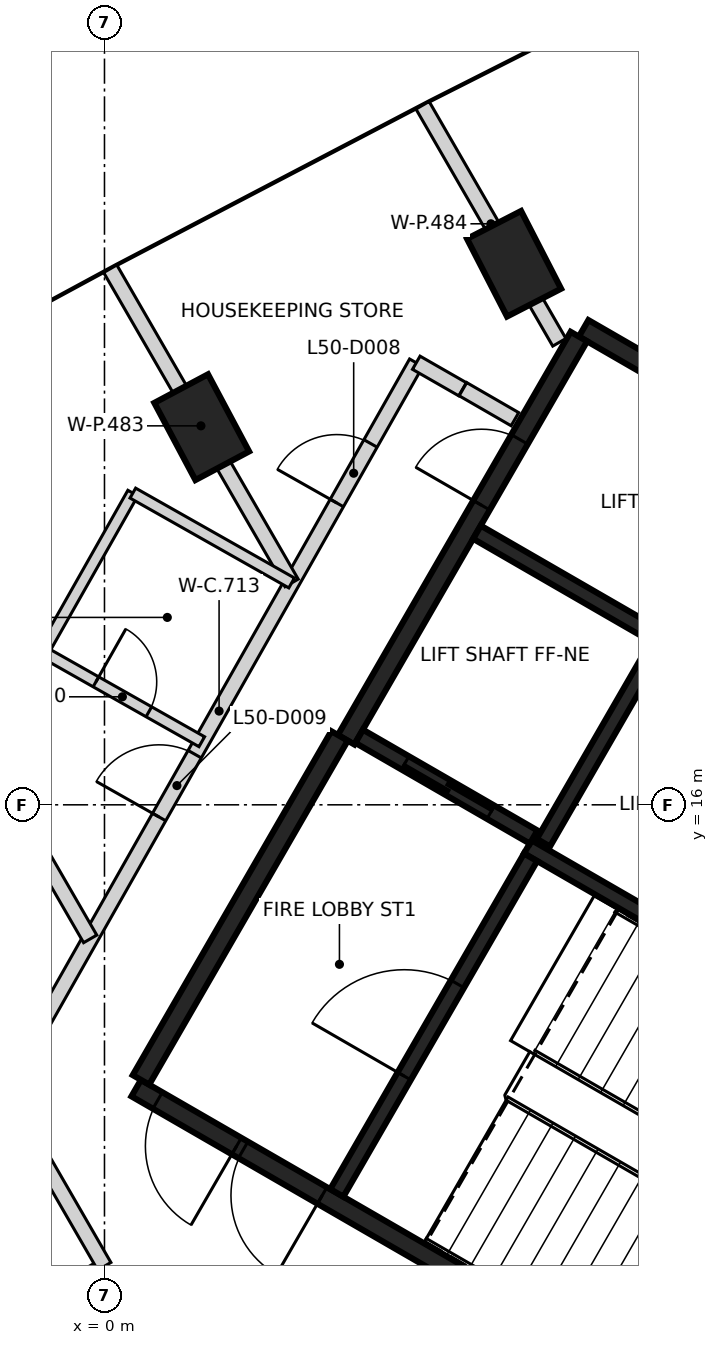
"""IFC4 building model, lengths in metres.
Left out: names, types, materials, properties, quantities, classifications, styles, units other than length and angle.
Written with IfcOpenShell. Run it as: python <this file> out.ifc"""

import sys

from ifc_helpers import new_model, si_unit, direction, frame, frame_2d, origin, origin_2d, place, context, subcontext, project, spatial, rectangle, extrude, element, fill, save


model = new_model("IFC4")
c1 = context("Model", 3, precision=1e-05, world=origin(), true_north=direction((0.0, 1.0)))
c2 = subcontext(c1, "Body", "Model", "MODEL_VIEW")
j1 = project(units=[si_unit("LENGTHUNIT", "METRE"), si_unit("PLANEANGLEUNIT", "RADIAN")], contexts=[c1])
p1 = place(None, origin())
s1 = spatial("IfcSite", under=j1, at=p1, CompositionType="ELEMENT")
p2 = place(p1, origin())
s2 = spatial("IfcBuilding", under=s1, at=p2, CompositionType="ELEMENT")
p3 = place(p2, frame((0.0, 0.0, 200.8)))
s3 = spatial("IfcBuildingStorey", under=s2, at=p3, CompositionType="ELEMENT", Elevation=200.8)
for number, where, z_axis, x_axis in (
    (1, (5.388, 23.118, -0.35), (0.0, 0.0, 1.0), (-0.458, 0.889, 0.0)),
    (2, (1.279, 20.968, -0.35), (0.0, 0.0, 1.0), (-0.47, 0.883, 0.0)),
):
    element("IfcColumn", number, at=place(p3, frame(where, z_axis=z_axis, x_axis=x_axis)), inside=s3, PredefinedType="COLUMN", context=c2, shape_type="SweptSolid", body=[
        extrude(rectangle(XDim=1.15, YDim=0.8, at=origin_2d()), origin(), (0.0, 0.0, 1.0), 3.6),
    ])
p4 = place(p3, frame((10.42, 6.498, 0.0), z_axis=(0.0, 0.0, 1.0), x_axis=(-0.866021906294, 0.500006057782, 0.0)))
e3 = element("IfcWall", 3, at=p4, inside=s3, PredefinedType="SHEAR", context=c2, shape_type="SweptSolid", body=[
    extrude(rectangle(XDim=11.55, YDim=0.25, at=frame_2d((5.775, 0.0))), origin(), (0.0, 0.0, 1.0), 3.25),
])
p5 = place(p4, frame((10.025, 0.0, 0.0)))
e4 = element("IfcOpeningElement", 4, at=p5, cuts=e3, PredefinedType="OPENING", context=c2, shape_type="SweptSolid", body=[
    extrude(rectangle(XDim=1.2, YDim=2.1, at=frame_2d((0.6, 1.05))), frame((0.0, 0.135, 0.0), z_axis=(0.0, -1.0, 0.0), x_axis=(1.0, 0.0, 0.0)), (0.0, 0.0, 1.0), 0.27),
])
p6 = place(p4, frame((8.725, 0.0, 0.0)))
e5 = element("IfcOpeningElement", 5, at=p6, cuts=e3, PredefinedType="OPENING", context=c2, shape_type="SweptSolid", body=[
    extrude(rectangle(XDim=1.2, YDim=2.1, at=frame_2d((0.6, 1.05))), frame((0.0, 0.135, 0.0), z_axis=(0.0, -1.0, 0.0), x_axis=(1.0, 0.0, 0.0)), (0.0, 0.0, 1.0), 0.27),
])
p7 = place(p3, frame((6.304, 22.269, 0.0), z_axis=(0.0, 0.0, 1.0), x_axis=(0.866022959057, -0.500004234368, 0.0)))
e6 = element("IfcWall", 6, at=p7, inside=s3, PredefinedType="SHEAR", context=c2, shape_type="SweptSolid", body=[
    extrude(rectangle(XDim=8.75, YDim=0.25, at=frame_2d((4.375, 0.0))), origin(), (0.0, 0.0, 1.0), 3.25),
])
p8 = place(p3, frame((3.179, 16.856, 0.0), z_axis=(0.0, 0.0, 1.0), x_axis=(0.500001955336, 0.866024274868, 0.0)))
e7 = element("IfcWall", 7, at=p8, inside=s3, PredefinedType="SHEAR", context=c2, shape_type="SweptSolid", body=[
    extrude(rectangle(XDim=6.125, YDim=0.25, at=frame_2d((3.062, 0.0))), origin(), (0.0, 0.0, 1.0), 3.25),
])
p9 = place(p8, frame((3.563, 0.0, 0.0)))
e8 = element("IfcOpeningElement", 8, at=p9, cuts=e7, PredefinedType="OPENING", context=c2, shape_type="SweptSolid", body=[
    extrude(rectangle(XDim=1.0, YDim=2.1, at=frame_2d((0.5, 1.05))), frame((0.0, 0.135, 0.0), z_axis=(0.0, -1.0, 0.0), x_axis=(1.0, 0.0, 0.0)), (0.0, 0.0, 1.0), 0.27),
])
p10 = place(p3, frame((0.48, 12.381, 0.0), z_axis=(0.0, 0.0, 1.0), x_axis=(0.49999885962, 0.866026062182, 0.0)))
e9 = element("IfcWall", 9, at=p10, inside=s3, PredefinedType="SHEAR", context=c2, shape_type="SweptSolid", body=[
    extrude(rectangle(XDim=5.225, YDim=0.25, at=frame_2d((2.612, 0.0))), origin(), (0.0, 0.0, 1.0), 3.25),
])
p11 = place(p3, frame((10.743, 12.46, 0.0), z_axis=(0.0, 0.0, 1.0), x_axis=(-0.866018848283, 0.500011354289, 0.0)))
e10 = element("IfcWall", 10, at=p11, inside=s3, PredefinedType="SHEAR", context=c2, shape_type="SweptSolid", body=[
    extrude(rectangle(XDim=5.974, YDim=0.2, at=frame_2d((2.987, 0.0))), origin(), (0.0, 0.0, 1.0), 3.25),
])
p12 = place(p3, frame((3.057, 10.895, 0.0), z_axis=(0.0, 0.0, 1.0), x_axis=(0.500027839223, 0.866009330205, 0.0)))
e11 = element("IfcWall", 11, at=p12, inside=s3, PredefinedType="SHEAR", context=c2, shape_type="SweptSolid", body=[
    extrude(rectangle(XDim=5.098, YDim=0.2, at=frame_2d((2.549, 0.0))), origin(), (0.0, 0.0, 1.0), 3.25),
])
p13 = place(p12, frame((1.774, 0.0, 0.0)))
e12 = element("IfcOpeningElement", 12, at=p13, cuts=e11, PredefinedType="OPENING", context=c2, shape_type="SweptSolid", body=[
    extrude(rectangle(XDim=1.4, YDim=2.1, at=frame_2d((0.7, 1.05))), frame((0.0, 0.11, 0.0), z_axis=(0.0, -1.0, 0.0), x_axis=(1.0, 0.0, 0.0)), (0.0, 0.0, 1.0), 0.22),
])
p14 = place(p3, frame((7.324, 18.187, 0.0), z_axis=(0.0, 0.0, 1.0), x_axis=(-0.499967891604, -0.866043940782, 0.0)))
e13 = element("IfcWall", 13, at=p14, inside=s3, PredefinedType="SHEAR", context=c2, shape_type="SweptSolid", body=[
    extrude(rectangle(XDim=3.1, YDim=0.2, at=frame_2d((1.55, 0.0))), origin(), (0.0, 0.0, 1.0), 3.25),
])
p15 = place(p3, frame((5.646, 15.576, 0.0), z_axis=(0.0, 0.0, 1.0), x_axis=(-0.866018407898, 0.500012117035, 0.0)))
e14 = element("IfcWall", 14, at=p15, inside=s3, PredefinedType="SHEAR", context=c2, shape_type="SweptSolid", body=[
    extrude(rectangle(XDim=2.651, YDim=0.2, at=frame_2d((1.325, 0.0))), origin(), (0.0, 0.0, 1.0), 3.25),
])
p16 = place(p15, frame((0.652, 0.0, 0.0)))
e15 = element("IfcOpeningElement", 15, at=p16, cuts=e14, PredefinedType="OPENING", context=c2, shape_type="SweptSolid", body=[
    extrude(rectangle(XDim=1.3, YDim=2.1, at=frame_2d((0.65, 1.05))), frame((0.0, 0.11, 0.0), z_axis=(0.0, -1.0, 0.0), x_axis=(1.0, 0.0, 0.0)), (0.0, 0.0, 1.0), 0.22),
])
p17 = place(p3, frame((7.196, 18.26, 0.0), z_axis=(0.0, 0.0, 1.0), x_axis=(-0.866018407898, 0.500012117035, 0.0)))
e16 = element("IfcWall", 16, at=p17, inside=s3, PredefinedType="SHEAR", context=c2, shape_type="SweptSolid", body=[
    extrude(rectangle(XDim=2.651, YDim=0.2, at=frame_2d((1.325, 0.0))), origin(), (0.0, 0.0, 1.0), 3.25),
])
p18 = place(p3, frame((-10.334, 3.963, 0.0), z_axis=(0.0, 0.0, 1.0), x_axis=(0.866013159114, 0.500021207791, 0.0)))
e17 = element("IfcWall", 17, at=p18, inside=s3, PredefinedType="PARTITIONING", context=c2, shape_type="SweptSolid", body=[
    extrude(rectangle(XDim=11.931, YDim=0.2, at=frame_2d((5.966, 0.0))), origin(), (0.0, 0.0, 1.0), 3.25),
])
p19 = place(p18, frame((10.103, 0.0, 0.0)))
e18 = element("IfcOpeningElement", 18, at=p19, cuts=e17, PredefinedType="OPENING", context=c2, shape_type="SweptSolid", body=[
    extrude(rectangle(XDim=1.0, YDim=2.1, at=frame_2d((0.5, 1.05))), frame((0.0, 0.11, 0.0), z_axis=(0.0, -1.0, 0.0), x_axis=(1.0, 0.0, 0.0)), (0.0, 0.0, 1.0), 0.22),
])
p20 = place(p18, frame((8.149, 0.0, 0.0)))
e19 = element("IfcOpeningElement", 19, at=p20, cuts=e17, PredefinedType="OPENING", context=c2, shape_type="SweptSolid", body=[
    extrude(rectangle(XDim=0.95, YDim=2.1, at=frame_2d((0.475, 1.05))), frame((0.0, 0.11, 0.0), z_axis=(0.0, -1.0, 0.0), x_axis=(1.0, 0.0, 0.0)), (0.0, 0.0, 1.0), 0.22),
])
p21 = place(p18, frame((1.831, 0.0, 0.0)))
e20 = element("IfcOpeningElement", 20, at=p21, cuts=e17, PredefinedType="OPENING", context=c2, shape_type="SweptSolid", body=[
    extrude(rectangle(XDim=1.0, YDim=2.1, at=frame_2d((0.5, 1.05))), frame((0.0, 0.11, 0.0), z_axis=(0.0, -1.0, 0.0), x_axis=(1.0, 0.0, 0.0)), (0.0, 0.0, 1.0), 0.22),
])
p22 = place(p3, frame((-1.086, 12.65, 0.0), z_axis=(0.0, 0.0, 1.0), x_axis=(0.492507119433, 0.870308415051, 0.0)))
e21 = element("IfcWall", 21, at=p22, inside=s3, PredefinedType="PARTITIONING", context=c2, shape_type="SweptSolid", body=[
    extrude(rectangle(XDim=10.531, YDim=0.2, at=frame_2d((5.266, 0.0))), origin(), (0.0, 0.0, 1.0), 3.25),
])
p23 = place(p22, frame((8.411, 0.0, 0.0)))
e22 = element("IfcOpeningElement", 22, at=p23, cuts=e21, PredefinedType="OPENING", context=c2, shape_type="SweptSolid", body=[
    extrude(rectangle(XDim=0.9, YDim=2.1, at=frame_2d((0.45, 1.05))), frame((0.0, 0.11, 0.0), z_axis=(0.0, -1.0, 0.0), x_axis=(1.0, 0.0, 0.0)), (0.0, 0.0, 1.0), 0.22),
])
p24 = place(p22, frame((3.664, 0.0, 0.0)))
e23 = element("IfcOpeningElement", 23, at=p24, cuts=e21, PredefinedType="OPENING", context=c2, shape_type="SweptSolid", body=[
    extrude(rectangle(XDim=0.95, YDim=2.1, at=frame_2d((0.475, 1.05))), frame((0.0, 0.11, 0.0), z_axis=(0.0, -1.0, 0.0), x_axis=(1.0, 0.0, 0.0)), (0.0, 0.0, 1.0), 0.22),
])
p25 = place(p3, frame((-0.964, 11.595, 0.0), z_axis=(0.0, 0.0, 1.0), x_axis=(0.500110566207, -0.865961558944, 0.0)))
e24 = element("IfcWall", 24, at=p25, inside=s3, PredefinedType="PARTITIONING", context=c2, shape_type="SweptSolid", body=[
    extrude(rectangle(XDim=1.924, YDim=0.2, at=frame_2d((0.962, 0.0))), origin(), (0.0, 0.0, 1.0), 3.25),
])
p26 = place(p3, frame((4.102, 21.816, 0.0), z_axis=(0.0, 0.0, 1.0), x_axis=(0.867664502326, -0.497150189986, 0.0)))
e25 = element("IfcWall", 25, at=p26, inside=s3, PredefinedType="PARTITIONING", context=c2, shape_type="SweptSolid", body=[
    extrude(rectangle(XDim=0.702, YDim=0.2, at=frame_2d((0.351, 0.0))), origin(), (0.0, 0.0, 1.0), 3.25),
])
p27 = place(p3, frame((4.716, 21.468, 0.0), z_axis=(0.0, 0.0, 1.0), x_axis=(0.865912682783, -0.500195187698, 0.0)))
e26 = element("IfcWall", 26, at=p27, inside=s3, PredefinedType="PARTITIONING", context=c2, shape_type="SweptSolid", body=[
    extrude(rectangle(XDim=0.79, YDim=0.2, at=frame_2d((0.395, 0.0))), origin(), (0.0, 0.0, 1.0), 3.25),
])
p28 = place(p3, frame((-4.004, 20.845, 0.0), z_axis=(0.0, 0.0, 1.0), x_axis=(0.500003076341, -0.866023627651, 0.0)))
e27 = element("IfcWall", 27, at=p28, inside=s3, PredefinedType="PARTITIONING", context=c2, shape_type="SweptSolid", body=[
    extrude(rectangle(XDim=7.631, YDim=0.2, at=frame_2d((3.816, 0.0))), origin(), (0.0, 0.0, 1.0), 3.25),
])
p29 = place(p3, frame((0.076, 23.052, 0.0), z_axis=(0.0, 0.0, 1.0), x_axis=(0.499957131376, -0.866050152581, 0.0)))
e28 = element("IfcWall", 28, at=p29, inside=s3, PredefinedType="PARTITIONING", context=c2, shape_type="SweptSolid", body=[
    extrude(rectangle(XDim=4.773, YDim=0.2, at=frame_2d((2.386, 0.0))), origin(), (0.0, 0.0, 1.0), 3.25),
])
p30 = place(p3, frame((4.184, 25.203, 0.0), z_axis=(0.0, 0.0, 1.0), x_axis=(0.4998731114, -0.866098650558, 0.0)))
e29 = element("IfcWall", 29, at=p30, inside=s3, PredefinedType="PARTITIONING", context=c2, shape_type="SweptSolid", body=[
    extrude(rectangle(XDim=3.601, YDim=0.2, at=frame_2d((1.8, 0.0))), origin(), (0.0, 0.0, 1.0), 3.25),
])
p31 = place(p3, frame((-0.809, 18.012, 0.0), z_axis=(0.0, 0.0, 1.0), x_axis=(0.492476131012, 0.870325950655, 0.0)))
e30 = element("IfcWall", 30, at=p31, inside=s3, PredefinedType="PARTITIONING", context=c2, shape_type="SweptSolid", body=[
    extrude(rectangle(XDim=2.4, YDim=0.15, at=frame_2d((1.2, 0.0))), origin(), (0.0, 0.0, 1.0), 3.25),
])
p32 = place(p3, frame((-0.809, 18.012, 0.0), z_axis=(0.0, 0.0, 1.0), x_axis=(0.870369543509, -0.492399083806, 0.0)))
e31 = element("IfcWall", 31, at=p32, inside=s3, PredefinedType="PARTITIONING", context=c2, shape_type="SweptSolid", body=[
    extrude(rectangle(XDim=2.4, YDim=0.15, at=frame_2d((1.2, 0.0))), origin(), (0.0, 0.0, 1.0), 3.25),
])
p33 = place(p32, frame((0.8, 0.0, 0.0)))
e32 = element("IfcOpeningElement", 32, at=p33, cuts=e31, PredefinedType="OPENING", context=c2, shape_type="SweptSolid", body=[
    extrude(rectangle(XDim=0.8, YDim=2.1, at=frame_2d((0.4, 1.05))), frame((0.0, 0.085, 0.0), z_axis=(0.0, -1.0, 0.0), x_axis=(1.0, 0.0, 0.0)), (0.0, 0.0, 1.0), 0.17),
])
p34 = place(p3, frame((0.373, 20.101, 0.0), z_axis=(0.0, 0.0, 1.0), x_axis=(0.870301279559, -0.492519728334, 0.0)))
e33 = element("IfcWall", 33, at=p34, inside=s3, PredefinedType="PARTITIONING", context=c2, shape_type="SweptSolid", body=[
    extrude(rectangle(XDim=2.4, YDim=0.15, at=frame_2d((1.2, 0.0))), origin(), (0.0, 0.0, 1.0), 3.25),
])
p35 = place(p16, origin())
e34 = element("IfcDoor", 34, at=p35, inside=s3, OperationType="SLIDING_TO_RIGHT", PredefinedType="DOOR", context=c2, shape_type="SweptSolid", body=[
    extrude(rectangle(XDim=1.3, YDim=2.1, at=frame_2d((0.65, 1.05))), frame((0.0, 0.025, 0.0), z_axis=(0.0, -1.0, 0.0), x_axis=(1.0, 0.0, 0.0)), (0.0, 0.0, 1.0), 0.05),
])
fill(e15, e34)
p36 = place(p9, origin())
e35 = element("IfcDoor", 35, at=p36, inside=s3, OperationType="SINGLE_SWING_LEFT", PredefinedType="DOOR", context=c2, shape_type="SweptSolid", body=[
    extrude(rectangle(XDim=1.0, YDim=2.1, at=frame_2d((0.5, 1.05))), frame((0.0, 0.025, 0.0), z_axis=(0.0, -1.0, 0.0), x_axis=(1.0, 0.0, 0.0)), (0.0, 0.0, 1.0), 0.05),
])
fill(e8, e35)
p37 = place(p5, origin())
e36 = element("IfcDoor", 36, at=p37, inside=s3, OperationType="SINGLE_SWING_LEFT", PredefinedType="DOOR", context=c2, shape_type="SweptSolid", body=[
    extrude(rectangle(XDim=1.2, YDim=2.1, at=frame_2d((0.6, 1.05))), frame((0.0, 0.025, 0.0), z_axis=(0.0, -1.0, 0.0), x_axis=(1.0, 0.0, 0.0)), (0.0, 0.0, 1.0), 0.05),
])
fill(e4, e36)
p38 = place(p6, origin())
e37 = element("IfcDoor", 37, at=p38, inside=s3, OperationType="SINGLE_SWING_RIGHT", PredefinedType="DOOR", context=c2, shape_type="SweptSolid", body=[
    extrude(rectangle(XDim=1.2, YDim=2.1, at=frame_2d((0.6, 1.05))), frame((0.0, 0.025, 0.0), z_axis=(0.0, -1.0, 0.0), x_axis=(1.0, 0.0, 0.0)), (0.0, 0.0, 1.0), 0.05),
])
fill(e5, e37)
p39 = place(p13, origin())
e38 = element("IfcDoor", 38, at=p39, inside=s3, OperationType="SINGLE_SWING_RIGHT", PredefinedType="DOOR", context=c2, shape_type="SweptSolid", body=[
    extrude(rectangle(XDim=1.4, YDim=2.1, at=frame_2d((0.7, 1.05))), frame((0.0, 0.025, 0.0), z_axis=(0.0, -1.0, 0.0), x_axis=(1.0, 0.0, 0.0)), (0.0, 0.0, 1.0), 0.05),
])
fill(e12, e38)
p40 = place(p23, origin())
e39 = element("IfcDoor", 39, at=p40, inside=s3, OperationType="SINGLE_SWING_LEFT", PredefinedType="DOOR", context=c2, shape_type="SweptSolid", body=[
    extrude(rectangle(XDim=0.9, YDim=2.1, at=frame_2d((0.45, 1.05))), frame((0.0, 0.025, 0.0), z_axis=(0.0, -1.0, 0.0), x_axis=(1.0, 0.0, 0.0)), (0.0, 0.0, 1.0), 0.05),
])
fill(e22, e39)
p41 = place(p24, origin())
e40 = element("IfcDoor", 40, at=p41, inside=s3, OperationType="SINGLE_SWING_LEFT", PredefinedType="DOOR", context=c2, shape_type="SweptSolid", body=[
    extrude(rectangle(XDim=0.95, YDim=2.1, at=frame_2d((0.475, 1.05))), frame((0.0, 0.025, 0.0), z_axis=(0.0, -1.0, 0.0), x_axis=(1.0, 0.0, 0.0)), (0.0, 0.0, 1.0), 0.05),
])
fill(e23, e40)
p42 = place(p33, origin())
e41 = element("IfcDoor", 41, at=p42, inside=s3, OperationType="SINGLE_SWING_LEFT", PredefinedType="DOOR", context=c2, shape_type="SweptSolid", body=[
    extrude(rectangle(XDim=0.8, YDim=2.1, at=frame_2d((0.4, 1.05))), frame((0.0, 0.025, 0.0), z_axis=(0.0, -1.0, 0.0), x_axis=(1.0, 0.0, 0.0)), (0.0, 0.0, 1.0), 0.05),
])
fill(e32, e41)
save(model, sys.argv[1])
